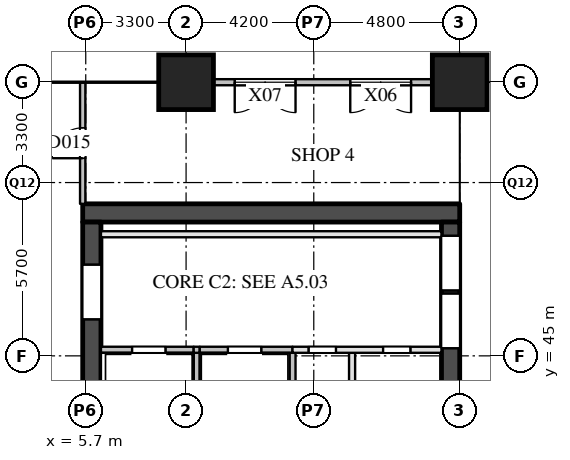
"""IFC4 building model, lengths in metres.
Left out: names, types, materials, properties, quantities, classifications, styles, units other than length and angle.
Written with IfcOpenShell. Run it as: python <this file> out.ifc"""

import sys

from ifc_helpers import new_model, si_unit, direction, frame, frame_2d, origin, origin_2d, place, context, subcontext, project, spatial, rectangle, extrude, element, fill, save


model = new_model("IFC4")
c1 = context("Model", 3, precision=1e-05, world=origin(), true_north=direction((0.0, 1.0)))
c2 = subcontext(c1, "Body", "Model", "MODEL_VIEW")
j1 = project(units=[si_unit("LENGTHUNIT", "METRE"), si_unit("PLANEANGLEUNIT", "RADIAN")], contexts=[c1])
p1 = place(None, origin())
s1 = spatial("IfcSite", under=j1, at=p1, CompositionType="ELEMENT")
p2 = place(p1, origin())
s2 = spatial("IfcBuilding", under=s1, at=p2, CompositionType="ELEMENT")
p3 = place(p2, origin())
s3 = spatial("IfcBuildingStorey", under=s2, at=p3, CompositionType="ELEMENT", Elevation=0.0)
for number, where, z_axis, x_axis in (
    (1, (9.0, 54.0, 0.0), (0.0, 0.0, 1.0), (1.0, 0.0, 0.0)),
    (2, (18.0, 54.0, 0.0), (0.0, 0.0, 1.0), (1.0, 0.0, 0.0)),
):
    element("IfcColumn", number, at=place(p3, frame(where, z_axis=z_axis, x_axis=x_axis)), inside=s3, PredefinedType="COLUMN", context=c2, shape_type="SweptSolid", body=[
        extrude(rectangle(XDim=1.8, YDim=1.8, at=origin_2d()), origin(), (0.0, 0.0, 1.0), 8.0),
    ])
p4 = place(p3, frame((17.1, 54.0, 0.0), z_axis=(0.0, 0.0, 1.0), x_axis=(-1.0, 0.0, 0.0)))
e3 = element("IfcWall", 3, at=p4, inside=s3, PredefinedType="SOLIDWALL", context=c2, shape_type="SweptSolid", body=[
    extrude(rectangle(XDim=7.2, YDim=0.2, at=frame_2d((3.6, 0.0))), origin(), (0.0, 0.0, 1.0), 6.59),
])
p5 = place(p4, frame((0.7, 0.0, 0.0)))
e4 = element("IfcOpeningElement", 4, at=p5, cuts=e3, PredefinedType="OPENING", context=c2, shape_type="SweptSolid", body=[
    extrude(rectangle(XDim=2.0, YDim=2.4, at=frame_2d((1.0, 1.2))), frame((0.0, 0.11, 0.0), z_axis=(0.0, -1.0, 0.0), x_axis=(1.0, 0.0, 0.0)), (0.0, 0.0, 1.0), 0.22),
])
p6 = place(p4, frame((0.7, 0.0, 2.5)))
e5 = element("IfcOpeningElement", 5, at=p6, cuts=e3, PredefinedType="OPENING", context=c2, shape_type="SweptSolid", body=[
    extrude(rectangle(XDim=2.0, YDim=3.99, at=frame_2d((1.0, 1.995))), frame((0.0, 0.11, 0.0), z_axis=(0.0, -1.0, 0.0), x_axis=(1.0, 0.0, 0.0)), (0.0, 0.0, 1.0), 0.22),
])
p7 = place(p4, frame((4.5, 0.0, 0.0)))
e6 = element("IfcOpeningElement", 6, at=p7, cuts=e3, PredefinedType="OPENING", context=c2, shape_type="SweptSolid", body=[
    extrude(rectangle(XDim=2.0, YDim=2.4, at=frame_2d((1.0, 1.2))), frame((0.0, 0.11, 0.0), z_axis=(0.0, -1.0, 0.0), x_axis=(1.0, 0.0, 0.0)), (0.0, 0.0, 1.0), 0.22),
])
p8 = place(p4, frame((4.5, 0.0, 2.5)))
e7 = element("IfcOpeningElement", 7, at=p8, cuts=e3, PredefinedType="OPENING", context=c2, shape_type="SweptSolid", body=[
    extrude(rectangle(XDim=2.0, YDim=3.99, at=frame_2d((1.0, 1.995))), frame((0.0, 0.11, 0.0), z_axis=(0.0, -1.0, 0.0), x_axis=(1.0, 0.0, 0.0)), (0.0, 0.0, 1.0), 0.22),
])
p9 = place(p3, frame((5.6, 49.7, 0.0), z_axis=(0.0, 0.0, 1.0), x_axis=(1.0, 0.0, 0.0)))
e8 = element("IfcWall", 8, at=p9, inside=s3, PredefinedType="SHEAR", context=c2, shape_type="SweptSolid", body=[
    extrude(rectangle(XDim=12.4, YDim=0.6, at=frame_2d((6.2, 0.0))), origin(), (0.0, 0.0, 1.0), 7.59),
])
p10 = place(p3, frame((5.9, 29.1, 0.0), z_axis=(0.0, 0.0, 1.0), x_axis=(0.0, 1.0, 0.0)))
e9 = element("IfcWall", 9, at=p10, inside=s3, PredefinedType="SHEAR", context=c2, shape_type="SweptSolid", body=[
    extrude(rectangle(XDim=20.3, YDim=0.6, at=frame_2d((10.15, 0.0))), origin(), (0.0, 0.0, 1.0), 7.59),
])
p11 = place(p10, frame((3.6, 0.0, 0.0)))
e10 = element("IfcOpeningElement", 10, at=p11, cuts=e9, PredefinedType="OPENING", context=c2, shape_type="SweptSolid", body=[
    extrude(rectangle(XDim=1.8, YDim=2.1, at=frame_2d((0.9, 1.05))), frame((0.0, 0.31, 0.0), z_axis=(0.0, -1.0, 0.0), x_axis=(1.0, 0.0, 0.0)), (0.0, 0.0, 1.0), 0.62),
])
p12 = place(p10, frame((17.1, 0.0, 0.0)))
e11 = element("IfcOpeningElement", 11, at=p12, cuts=e9, PredefinedType="OPENING", context=c2, shape_type="SweptSolid", body=[
    extrude(rectangle(XDim=1.8, YDim=2.1, at=frame_2d((0.9, 1.05))), frame((0.0, 0.31, 0.0), z_axis=(0.0, -1.0, 0.0), x_axis=(1.0, 0.0, 0.0)), (0.0, 0.0, 1.0), 0.62),
])
p13 = place(p3, frame((17.7, 29.1, 0.0), z_axis=(0.0, 0.0, 1.0), x_axis=(0.0, 1.0, 0.0)))
e12 = element("IfcWall", 12, at=p13, inside=s3, PredefinedType="SHEAR", context=c2, shape_type="SweptSolid", body=[
    extrude(rectangle(XDim=20.3, YDim=0.6, at=frame_2d((10.15, 0.0))), origin(), (0.0, 0.0, 1.0), 7.59),
])
p14 = place(p13, frame((1.25, 0.0, 0.0)))
e13 = element("IfcOpeningElement", 13, at=p14, cuts=e12, PredefinedType="OPENING", context=c2, shape_type="SweptSolid", body=[
    extrude(rectangle(XDim=0.7, YDim=2.1, at=frame_2d((0.35, 1.05))), frame((0.0, 0.31, 0.0), z_axis=(0.0, -1.0, 0.0), x_axis=(1.0, 0.0, 0.0)), (0.0, 0.0, 1.0), 0.62),
])
p15 = place(p13, frame((7.05, 0.0, 0.0)))
e14 = element("IfcOpeningElement", 14, at=p15, cuts=e12, PredefinedType="OPENING", context=c2, shape_type="SweptSolid", body=[
    extrude(rectangle(XDim=0.7, YDim=2.1, at=frame_2d((0.35, 1.05))), frame((0.0, 0.31, 0.0), z_axis=(0.0, -1.0, 0.0), x_axis=(1.0, 0.0, 0.0)), (0.0, 0.0, 1.0), 0.62),
])
p16 = place(p13, frame((17.95, 0.0, 0.0), z_axis=(0.0, 0.0, 1.0), x_axis=(-1.0, 0.0, 0.0)))
e15 = element("IfcOpeningElement", 15, at=p16, cuts=e12, PredefinedType="OPENING", context=c2, shape_type="SweptSolid", body=[
    extrude(rectangle(XDim=1.8, YDim=2.4, at=frame_2d((0.9, 1.2))), frame((0.0, 0.31, 0.0), z_axis=(0.0, -1.0, 0.0), x_axis=(1.0, 0.0, 0.0)), (0.0, 0.0, 1.0), 0.62),
])
p17 = place(p13, frame((19.85, 0.0, 0.0), z_axis=(0.0, 0.0, 1.0), x_axis=(-1.0, 0.0, 0.0)))
e16 = element("IfcOpeningElement", 16, at=p17, cuts=e12, PredefinedType="OPENING", context=c2, shape_type="SweptSolid", body=[
    extrude(rectangle(XDim=1.8, YDim=2.4, at=frame_2d((0.9, 1.2))), frame((0.0, 0.31, 0.0), z_axis=(0.0, -1.0, 0.0), x_axis=(1.0, 0.0, 0.0)), (0.0, 0.0, 1.0), 0.62),
])
for number, where, z_axis, x_axis in (
    (17, (9.35, 43.7, 0.0), (0.0, 0.0, 1.0), (0.0, 1.0, 0.0)),
    (18, (12.5, 43.7, 0.0), (0.0, 0.0, 1.0), (0.0, 1.0, 0.0)),
):
    element("IfcWall", number, at=place(p3, frame(where, z_axis=z_axis, x_axis=x_axis)), inside=s3, PredefinedType="SOLIDWALL", context=c2, shape_type="SweptSolid", body=[
        extrude(rectangle(XDim=1.5, YDim=0.2, at=frame_2d((0.75, 0.0))), origin(), (0.0, 0.0, 1.0), 7.59),
    ])
p18 = place(p3, frame((14.46, 39.0, 0.0), z_axis=(0.0, 0.0, 1.0), x_axis=(0.0, 1.0, 0.0)))
e19 = element("IfcWall", 19, at=p18, inside=s3, PredefinedType="PARTITIONING", context=c2, shape_type="SweptSolid", body=[
    extrude(rectangle(XDim=6.2, YDim=0.2, at=frame_2d((3.1, 0.0))), origin(), (0.0, 0.0, 1.0), 7.59),
])
p19 = place(p3, frame((12.5, 45.2, 0.0), z_axis=(0.0, 0.0, 1.0), x_axis=(1.0, 0.0, 0.0)))
e20 = element("IfcWall", 20, at=p19, inside=s3, PredefinedType="PARTITIONING", context=c2, shape_type="SweptSolid", body=[
    extrude(rectangle(XDim=4.9, YDim=0.2, at=frame_2d((2.45, 0.0))), origin(), (0.0, 0.0, 1.0), 7.59),
])
p20 = place(p19, frame((0.53, 0.0, 0.0)))
e21 = element("IfcOpeningElement", 21, at=p20, cuts=e20, PredefinedType="OPENING", context=c2, shape_type="SweptSolid", body=[
    extrude(rectangle(XDim=0.9, YDim=2.1, at=frame_2d((0.45, 1.05))), frame((0.0, 0.11, 0.0), z_axis=(0.0, -1.0, 0.0), x_axis=(1.0, 0.0, 0.0)), (0.0, 0.0, 1.0), 0.22),
])
p21 = place(p19, frame((2.98, 0.0, 0.0)))
e22 = element("IfcOpeningElement", 22, at=p21, cuts=e20, PredefinedType="OPENING", context=c2, shape_type="SweptSolid", body=[
    extrude(rectangle(XDim=0.9, YDim=2.1, at=frame_2d((0.45, 1.05))), frame((0.0, 0.11, 0.0), z_axis=(0.0, -1.0, 0.0), x_axis=(1.0, 0.0, 0.0)), (0.0, 0.0, 1.0), 0.22),
])
p22 = place(p3, frame((6.2, 45.2, 0.0), z_axis=(0.0, 0.0, 1.0), x_axis=(1.0, 0.0, 0.0)))
e23 = element("IfcWall", 23, at=p22, inside=s3, PredefinedType="SOLIDWALL", context=c2, shape_type="SweptSolid", body=[
    extrude(rectangle(XDim=3.05, YDim=0.2, at=frame_2d((1.525, 0.0))), origin(), (0.0, 0.0, 1.0), 7.59),
])
p23 = place(p22, frame((1.025, 0.0, 0.0)))
e24 = element("IfcOpeningElement", 24, at=p23, cuts=e23, PredefinedType="OPENING", context=c2, shape_type="SweptSolid", body=[
    extrude(rectangle(XDim=1.1, YDim=2.1, at=frame_2d((0.55, 1.05))), frame((0.0, 0.11, 0.0), z_axis=(0.0, -1.0, 0.0), x_axis=(1.0, 0.0, 0.0)), (0.0, 0.0, 1.0), 0.22),
])
p24 = place(p3, frame((9.25, 45.2, 0.0), z_axis=(0.0, 0.0, 1.0), x_axis=(1.0, 0.0, 0.0)))
e25 = element("IfcWall", 25, at=p24, inside=s3, PredefinedType="SOLIDWALL", context=c2, shape_type="SweptSolid", body=[
    extrude(rectangle(XDim=0.2, YDim=0.2, at=frame_2d((0.1, 0.0))), origin(), (0.0, 0.0, 1.0), 7.59),
])
p25 = place(p3, frame((9.45, 45.2, 0.0), z_axis=(0.0, 0.0, 1.0), x_axis=(1.0, 0.0, 0.0)))
e26 = element("IfcWall", 26, at=p25, inside=s3, PredefinedType="SOLIDWALL", context=c2, shape_type="SweptSolid", body=[
    extrude(rectangle(XDim=3.05, YDim=0.2, at=frame_2d((1.525, 0.0))), origin(), (0.0, 0.0, 1.0), 7.59),
])
p26 = place(p25, frame((0.925, 0.0, 0.0)))
e27 = element("IfcOpeningElement", 27, at=p26, cuts=e26, PredefinedType="OPENING", context=c2, shape_type="SweptSolid", body=[
    extrude(rectangle(XDim=1.1, YDim=2.1, at=frame_2d((0.55, 1.05))), frame((0.0, 0.11, 0.0), z_axis=(0.0, -1.0, 0.0), x_axis=(1.0, 0.0, 0.0)), (0.0, 0.0, 1.0), 0.22),
])
p27 = place(p3, frame((6.2, 49.0, 0.0), z_axis=(0.0, 0.0, 1.0), x_axis=(1.0, 0.0, 0.0)))
e28 = element("IfcWall", 28, at=p27, inside=s3, PredefinedType="PARTITIONING", context=c2, shape_type="SweptSolid", body=[
    extrude(rectangle(XDim=11.2, YDim=0.2, at=frame_2d((5.6, 0.0))), origin(), (0.0, 0.0, 1.0), 7.59),
])
p28 = place(p3, frame((5.6, 50.0, 0.0), z_axis=(0.0, 0.0, 1.0), x_axis=(0.0, 1.0, 0.0)))
e29 = element("IfcWall", 29, at=p28, inside=s3, PredefinedType="PARTITIONING", context=c2, shape_type="SweptSolid", body=[
    extrude(rectangle(XDim=4.0, YDim=0.175, at=frame_2d((2.0, 0.0))), origin(), (0.0, 0.0, 1.0), 6.59),
])
p29 = place(p28, frame((1.5, 0.0, 0.0)))
e30 = element("IfcOpeningElement", 30, at=p29, cuts=e29, PredefinedType="OPENING", context=c2, shape_type="SweptSolid", body=[
    extrude(rectangle(XDim=1.0, YDim=2.1, at=frame_2d((0.5, 1.05))), frame((0.0, 0.097, 0.0), z_axis=(0.0, -1.0, 0.0), x_axis=(1.0, 0.0, 0.0)), (0.0, 0.0, 1.0), 0.195),
])
p30 = place(p5, origin())
e31 = element("IfcDoor", 31, at=p30, inside=s3, OperationType="DOUBLE_DOOR_SINGLE_SWING", PredefinedType="DOOR", context=c2, shape_type="SweptSolid", body=[
    extrude(rectangle(XDim=2.0, YDim=2.4, at=frame_2d((1.0, 1.2))), frame((0.0, 0.025, 0.0), z_axis=(0.0, -1.0, 0.0), x_axis=(1.0, 0.0, 0.0)), (0.0, 0.0, 1.0), 0.05),
])
fill(e4, e31)
p31 = place(p6, origin())
e32 = element("IfcWindow", 32, at=p31, inside=s3, PartitioningType="SINGLE_PANEL", PredefinedType="WINDOW", context=c2, shape_type="SweptSolid", body=[
    extrude(rectangle(XDim=2.0, YDim=3.99, at=frame_2d((1.0, 1.995))), frame((0.0, 0.03, 0.0), z_axis=(0.0, -1.0, 0.0), x_axis=(1.0, 0.0, 0.0)), (0.0, 0.0, 1.0), 0.06),
])
fill(e5, e32)
p32 = place(p7, origin())
e33 = element("IfcDoor", 33, at=p32, inside=s3, OperationType="DOUBLE_DOOR_SINGLE_SWING", PredefinedType="DOOR", context=c2, shape_type="SweptSolid", body=[
    extrude(rectangle(XDim=2.0, YDim=2.4, at=frame_2d((1.0, 1.2))), frame((0.0, 0.025, 0.0), z_axis=(0.0, -1.0, 0.0), x_axis=(1.0, 0.0, 0.0)), (0.0, 0.0, 1.0), 0.05),
])
fill(e6, e33)
p33 = place(p8, origin())
e34 = element("IfcWindow", 34, at=p33, inside=s3, PartitioningType="SINGLE_PANEL", PredefinedType="WINDOW", context=c2, shape_type="SweptSolid", body=[
    extrude(rectangle(XDim=2.0, YDim=3.99, at=frame_2d((1.0, 1.995))), frame((0.0, 0.03, 0.0), z_axis=(0.0, -1.0, 0.0), x_axis=(1.0, 0.0, 0.0)), (0.0, 0.0, 1.0), 0.06),
])
fill(e7, e34)
p34 = place(p23, origin())
e35 = element("IfcDoor", 35, at=p34, inside=s3, OperationType="SINGLE_SWING_RIGHT", PredefinedType="DOOR", context=c2, shape_type="SweptSolid", body=[
    extrude(rectangle(XDim=1.1, YDim=2.1, at=frame_2d((0.55, 1.05))), frame((0.0, 0.025, 0.0), z_axis=(0.0, -1.0, 0.0), x_axis=(1.0, 0.0, 0.0)), (0.0, 0.0, 1.0), 0.05),
])
fill(e24, e35)
p35 = place(p26, origin())
e36 = element("IfcDoor", 36, at=p35, inside=s3, OperationType="SINGLE_SWING_LEFT", PredefinedType="DOOR", context=c2, shape_type="SweptSolid", body=[
    extrude(rectangle(XDim=1.1, YDim=2.1, at=frame_2d((0.55, 1.05))), frame((0.0, 0.025, 0.0), z_axis=(0.0, -1.0, 0.0), x_axis=(1.0, 0.0, 0.0)), (0.0, 0.0, 1.0), 0.05),
])
fill(e27, e36)
p36 = place(p20, origin())
e37 = element("IfcDoor", 37, at=p36, inside=s3, OperationType="SINGLE_SWING_LEFT", PredefinedType="DOOR", context=c2, shape_type="SweptSolid", body=[
    extrude(rectangle(XDim=0.9, YDim=2.1, at=frame_2d((0.45, 1.05))), frame((0.0, 0.025, 0.0), z_axis=(0.0, -1.0, 0.0), x_axis=(1.0, 0.0, 0.0)), (0.0, 0.0, 1.0), 0.05),
])
fill(e21, e37)
p37 = place(p21, origin())
e38 = element("IfcDoor", 38, at=p37, inside=s3, OperationType="SINGLE_SWING_RIGHT", PredefinedType="DOOR", context=c2, shape_type="SweptSolid", body=[
    extrude(rectangle(XDim=0.9, YDim=2.1, at=frame_2d((0.45, 1.05))), frame((0.0, 0.025, 0.0), z_axis=(0.0, -1.0, 0.0), x_axis=(1.0, 0.0, 0.0)), (0.0, 0.0, 1.0), 0.05),
])
fill(e22, e38)
p38 = place(p12, origin())
e39 = element("IfcDoor", 39, at=p38, inside=s3, OperationType="DOUBLE_DOOR_SINGLE_SWING", PredefinedType="DOOR", context=c2, shape_type="SweptSolid", body=[
    extrude(rectangle(XDim=1.8, YDim=2.1, at=frame_2d((0.9, 1.05))), frame((0.0, 0.025, 0.0), z_axis=(0.0, -1.0, 0.0), x_axis=(1.0, 0.0, 0.0)), (0.0, 0.0, 1.0), 0.05),
])
fill(e11, e39)
p39 = place(p16, origin())
e40 = element("IfcDoor", 40, at=p39, inside=s3, OperationType="DOUBLE_DOOR_SINGLE_SWING", PredefinedType="DOOR", context=c2, shape_type="SweptSolid", body=[
    extrude(rectangle(XDim=1.8, YDim=2.4, at=frame_2d((0.9, 1.2))), frame((0.0, 0.025, 0.0), z_axis=(0.0, -1.0, 0.0), x_axis=(1.0, 0.0, 0.0)), (0.0, 0.0, 1.0), 0.05),
])
fill(e15, e40)
p40 = place(p17, origin())
e41 = element("IfcDoor", 41, at=p40, inside=s3, OperationType="DOUBLE_DOOR_SINGLE_SWING", PredefinedType="DOOR", context=c2, shape_type="SweptSolid", body=[
    extrude(rectangle(XDim=1.8, YDim=2.4, at=frame_2d((0.9, 1.2))), frame((0.0, 0.025, 0.0), z_axis=(0.0, -1.0, 0.0), x_axis=(1.0, 0.0, 0.0)), (0.0, 0.0, 1.0), 0.05),
])
fill(e16, e41)
p41 = place(p29, origin())
e42 = element("IfcDoor", 42, at=p41, inside=s3, OperationType="SINGLE_SWING_LEFT", PredefinedType="DOOR", context=c2, shape_type="SweptSolid", body=[
    extrude(rectangle(XDim=1.0, YDim=2.1, at=frame_2d((0.5, 1.05))), frame((0.0, 0.025, 0.0), z_axis=(0.0, -1.0, 0.0), x_axis=(1.0, 0.0, 0.0)), (0.0, 0.0, 1.0), 0.05),
])
fill(e30, e42)
save(model, sys.argv[1])
